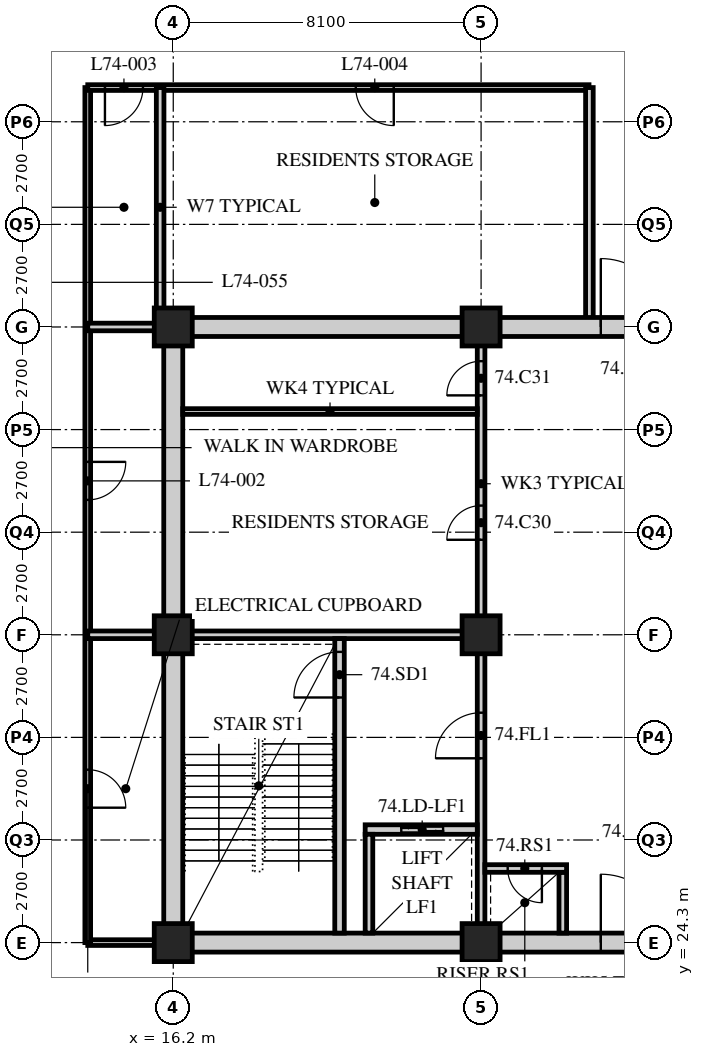
"""IFC4 building model, lengths in metres.
Left out: names, types, materials, properties, quantities, classifications, styles, units other than length and angle.
Written with IfcOpenShell. Run it as: python <this file> out.ifc"""

import sys

from ifc_helpers import new_model, si_unit, direction, frame, frame_2d, origin, origin_2d, place, context, subcontext, project, spatial, rectangle, hollow_rectangle, extrude, element, fill, save


model = new_model("IFC4")
c1 = context("Model", 3, precision=1e-05, world=origin(), true_north=direction((0.0, 1.0)))
c2 = subcontext(c1, "Body", "Model", "MODEL_VIEW")
j1 = project(units=[si_unit("LENGTHUNIT", "METRE"), si_unit("PLANEANGLEUNIT", "RADIAN")], contexts=[c1])
p1 = place(None, origin())
s1 = spatial("IfcSite", under=j1, at=p1, CompositionType="ELEMENT")
p2 = place(p1, origin())
s2 = spatial("IfcBuilding", under=s1, at=p2, CompositionType="ELEMENT")
p3 = place(p2, frame((0.0, 0.0, 289.2)))
s3 = spatial("IfcBuildingStorey", under=s2, at=p3, CompositionType="ELEMENT", Elevation=289.2)
for number, where, z_axis, x_axis in (
    (1, (16.2, 24.3, 0.0), (0.0, 0.0, 1.0), (1.0, 0.0, 0.0)),
    (2, (16.2, 32.4, 0.0), (0.0, 0.0, 1.0), (1.0, 0.0, 0.0)),
    (3, (16.2, 40.5, 0.0), (0.0, 0.0, 1.0), (1.0, 0.0, 0.0)),
    (4, (24.3, 24.3, 0.0), (0.0, 0.0, 1.0), (1.0, 0.0, 0.0)),
    (5, (24.3, 32.4, 0.0), (0.0, 0.0, 1.0), (1.0, 0.0, 0.0)),
    (6, (24.3, 40.5, 0.0), (0.0, 0.0, 1.0), (1.0, 0.0, 0.0)),
):
    element("IfcColumn", number, at=place(p3, frame(where, z_axis=z_axis, x_axis=x_axis)), inside=s3, PredefinedType="COLUMN", context=c2, shape_type="SweptSolid", body=[
        extrude(hollow_rectangle(XDim=1.0, YDim=1.0, WallThickness=0.1, at=origin_2d()), origin(), (0.0, 0.0, 1.0), 3.9),
    ])
p4 = place(p3, frame((16.0, 24.3, 0.0), z_axis=(0.0, 0.0, 1.0), x_axis=(-1.0, 0.0, 0.0)))
e7 = element("IfcWall", 7, at=p4, inside=s3, PredefinedType="PARTITIONING", context=c2, shape_type="SweptSolid", body=[
    extrude(rectangle(XDim=2.05, YDim=0.15, at=frame_2d((1.025, 0.0))), origin(), (0.0, 0.0, 1.0), 3.078),
])
p5 = place(p3, frame((13.95, 24.3, 0.0), z_axis=(0.0, 0.0, 1.0), x_axis=(0.0, 1.0, 0.0)))
e8 = element("IfcWall", 8, at=p5, inside=s3, PredefinedType="PARTITIONING", context=c2, shape_type="SweptSolid", body=[
    extrude(rectangle(XDim=22.5, YDim=0.15, at=frame_2d((11.25, 0.0))), origin(), (0.0, 0.0, 1.0), 3.69),
])
p6 = place(p5, frame((3.55, 0.0, 0.0)))
e9 = element("IfcOpeningElement", 9, at=p6, cuts=e8, PredefinedType="OPENING", context=c2, shape_type="SweptSolid", body=[
    extrude(rectangle(XDim=1.0, YDim=2.1, at=frame_2d((0.5, 1.05))), frame((0.0, 0.085, 0.0), z_axis=(0.0, -1.0, 0.0), x_axis=(1.0, 0.0, 0.0)), (0.0, 0.0, 1.0), 0.17),
])
p7 = place(p5, frame((11.65, 0.0, 0.0)))
e10 = element("IfcOpeningElement", 10, at=p7, cuts=e8, PredefinedType="OPENING", context=c2, shape_type="SweptSolid", body=[
    extrude(rectangle(XDim=1.0, YDim=2.1, at=frame_2d((0.5, 1.05))), frame((0.0, 0.085, 0.0), z_axis=(0.0, -1.0, 0.0), x_axis=(1.0, 0.0, 0.0)), (0.0, 0.0, 1.0), 0.17),
])
p8 = place(p3, frame((13.95, 46.8, 0.0), z_axis=(0.0, 0.0, 1.0), x_axis=(1.0, 0.0, 0.0)))
e11 = element("IfcWall", 11, at=p8, inside=s3, PredefinedType="PARTITIONING", context=c2, shape_type="SweptSolid", body=[
    extrude(rectangle(XDim=13.19, YDim=0.15, at=frame_2d((6.595, 0.0))), origin(), (0.0, 0.0, 1.0), 3.69),
])
p9 = place(p8, frame((0.452, 0.0, 0.0)))
e12 = element("IfcOpeningElement", 12, at=p9, cuts=e11, PredefinedType="OPENING", context=c2, shape_type="SweptSolid", body=[
    extrude(rectangle(XDim=1.0, YDim=2.1, at=frame_2d((0.5, 1.05))), frame((0.0, 0.085, 0.0), z_axis=(0.0, -1.0, 0.0), x_axis=(1.0, 0.0, 0.0)), (0.0, 0.0, 1.0), 0.17),
])
p10 = place(p8, frame((7.052, 0.0, 0.0)))
e13 = element("IfcOpeningElement", 13, at=p10, cuts=e11, PredefinedType="OPENING", context=c2, shape_type="SweptSolid", body=[
    extrude(rectangle(XDim=1.0, YDim=2.1, at=frame_2d((0.5, 1.05))), frame((0.0, 0.085, 0.0), z_axis=(0.0, -1.0, 0.0), x_axis=(1.0, 0.0, 0.0)), (0.0, 0.0, 1.0), 0.17),
])
p11 = place(p3, frame((13.95, 32.4, 0.0), z_axis=(0.0, 0.0, 1.0), x_axis=(1.0, 0.0, 0.0)))
e14 = element("IfcWall", 14, at=p11, inside=s3, PredefinedType="SOLIDWALL", context=c2, shape_type="SweptSolid", body=[
    extrude(rectangle(XDim=2.25, YDim=0.2, at=frame_2d((1.125, 0.0))), origin(), (0.0, 0.0, 1.0), 3.078),
])
for number, where, z_axis, x_axis in (
    (15, (15.855, 46.8, 0.0), (0.0, 0.0, 1.0), (0.0, -1.0, 0.0)),
    (16, (27.15, 40.5, 0.0), (0.0, 0.0, 1.0), (0.0, 1.0, 0.0)),
):
    element("IfcWall", number, at=place(p3, frame(where, z_axis=z_axis, x_axis=x_axis)), inside=s3, PredefinedType="SOLIDWALL", context=c2, shape_type="SweptSolid", body=[
        extrude(rectangle(XDim=6.3, YDim=0.2, at=frame_2d((3.15, 0.0))), origin(), (0.0, 0.0, 1.0), 3.69),
    ])
p12 = place(p3, frame((13.95, 40.5, 0.0), z_axis=(0.0, 0.0, 1.0), x_axis=(1.0, 0.0, 0.0)))
e17 = element("IfcWall", 17, at=p12, inside=s3, PredefinedType="SOLIDWALL", context=c2, shape_type="SweptSolid", body=[
    extrude(rectangle(XDim=2.25, YDim=0.2, at=frame_2d((1.125, 0.0))), origin(), (0.0, 0.0, 1.0), 3.078),
])
p13 = place(p3, frame((15.95, 24.3, 0.0), z_axis=(0.0, 0.0, 1.0), x_axis=(1.0, 0.0, 0.0)))
e18 = element("IfcWall", 18, at=p13, inside=s3, PredefinedType="SOLIDWALL", context=c2, shape_type="SweptSolid", body=[
    extrude(rectangle(XDim=24.55, YDim=0.5, at=frame_2d((12.275, 0.0))), origin(), (0.0, 0.0, 1.0), 3.04),
])
p14 = place(p13, frame((11.5, 0.0, 0.0)))
e19 = element("IfcOpeningElement", 19, at=p14, cuts=e18, PredefinedType="OPENING", context=c2, shape_type="SweptSolid", body=[
    extrude(rectangle(XDim=1.8, YDim=2.4, at=frame_2d((0.9, 1.2))), frame((0.0, 0.26, 0.0), z_axis=(0.0, -1.0, 0.0), x_axis=(1.0, 0.0, 0.0)), (0.0, 0.0, 1.0), 0.52),
])
p15 = place(p3, frame((15.95, 40.5, 0.0), z_axis=(0.0, 0.0, 1.0), x_axis=(1.0, 0.0, 0.0)))
e20 = element("IfcWall", 20, at=p15, inside=s3, PredefinedType="SOLIDWALL", context=c2, shape_type="SweptSolid", body=[
    extrude(rectangle(XDim=24.55, YDim=0.5, at=frame_2d((12.275, 0.0))), origin(), (0.0, 0.0, 1.0), 3.04),
])
p16 = place(p15, frame((11.5, 0.0, 0.0)))
e21 = element("IfcOpeningElement", 21, at=p16, cuts=e20, PredefinedType="OPENING", context=c2, shape_type="SweptSolid", body=[
    extrude(rectangle(XDim=1.8, YDim=2.4, at=frame_2d((0.9, 1.2))), frame((0.0, 0.26, 0.0), z_axis=(0.0, -1.0, 0.0), x_axis=(1.0, 0.0, 0.0)), (0.0, 0.0, 1.0), 0.52),
])
p17 = place(p3, frame((16.2, 24.55, 0.0), z_axis=(0.0, 0.0, 1.0), x_axis=(0.0, 1.0, 0.0)))
e22 = element("IfcWall", 22, at=p17, inside=s3, PredefinedType="SOLIDWALL", context=c2, shape_type="SweptSolid", body=[
    extrude(rectangle(XDim=15.7, YDim=0.5, at=frame_2d((7.85, 0.0))), origin(), (0.0, 0.0, 1.0), 3.078),
])
p18 = place(p3, frame((16.45, 32.4, 0.0), z_axis=(0.0, 0.0, 1.0), x_axis=(1.0, 0.0, 0.0)))
e23 = element("IfcWall", 23, at=p18, inside=s3, PredefinedType="SOLIDWALL", context=c2, shape_type="SweptSolid", body=[
    extrude(rectangle(XDim=7.95, YDim=0.2, at=frame_2d((3.975, 0.0))), origin(), (0.0, 0.0, 1.0), 3.078),
])
p19 = place(p3, frame((24.3, 24.55, 0.0), z_axis=(0.0, 0.0, 1.0), x_axis=(0.0, 1.0, 0.0)))
e24 = element("IfcWall", 24, at=p19, inside=s3, PredefinedType="SOLIDWALL", context=c2, shape_type="SweptSolid", body=[
    extrude(rectangle(XDim=7.75, YDim=0.2, at=frame_2d((3.875, 0.0))), origin(), (0.0, 0.0, 1.0), 3.078),
])
p20 = place(p19, frame((4.6, 0.0, 0.0)))
e25 = element("IfcOpeningElement", 25, at=p20, cuts=e24, PredefinedType="OPENING", context=c2, shape_type="SweptSolid", body=[
    extrude(rectangle(XDim=1.2, YDim=2.1, at=frame_2d((0.6, 1.05))), frame((0.0, 0.11, 0.0), z_axis=(0.0, -1.0, 0.0), x_axis=(1.0, 0.0, 0.0)), (0.0, 0.0, 1.0), 0.22),
])
p21 = place(p3, frame((20.575, 24.55, 0.0), z_axis=(0.0, 0.0, 1.0), x_axis=(0.0, 1.0, 0.0)))
e26 = element("IfcWall", 26, at=p21, inside=s3, PredefinedType="SOLIDWALL", context=c2, shape_type="SweptSolid", body=[
    extrude(rectangle(XDim=7.75, YDim=0.25, at=frame_2d((3.875, 0.0))), origin(), (0.0, 0.0, 1.0), 3.69),
])
p22 = place(p21, frame((6.2, 0.0, 0.0)))
e27 = element("IfcOpeningElement", 27, at=p22, cuts=e26, PredefinedType="OPENING", context=c2, shape_type="SweptSolid", body=[
    extrude(rectangle(XDim=1.2, YDim=2.1, at=frame_2d((0.6, 1.05))), frame((0.0, 0.135, 0.0), z_axis=(0.0, -1.0, 0.0), x_axis=(1.0, 0.0, 0.0)), (0.0, 0.0, 1.0), 0.27),
])
p23 = place(p3, frame((21.25, 27.275, 0.0), z_axis=(0.0, 0.0, 1.0), x_axis=(1.0, 0.0, 0.0)))
e28 = element("IfcWall", 28, at=p23, inside=s3, PredefinedType="SOLIDWALL", context=c2, shape_type="SweptSolid", body=[
    extrude(rectangle(XDim=2.95, YDim=0.25, at=frame_2d((1.475, 0.0))), origin(), (0.0, 0.0, 1.0), 3.69),
])
p24 = place(p23, frame((0.95, 0.0, 0.0)))
e29 = element("IfcOpeningElement", 29, at=p24, cuts=e28, PredefinedType="OPENING", context=c2, shape_type="SweptSolid", body=[
    extrude(rectangle(XDim=1.1, YDim=2.4, at=frame_2d((0.55, 1.2))), frame((0.0, 0.135, 0.0), z_axis=(0.0, -1.0, 0.0), x_axis=(1.0, 0.0, 0.0)), (0.0, 0.0, 1.0), 0.27),
])
p25 = place(p3, frame((21.35, 24.55, 0.0), z_axis=(0.0, 0.0, 1.0), x_axis=(0.0, 1.0, 0.0)))
e30 = element("IfcWall", 30, at=p25, inside=s3, PredefinedType="SOLIDWALL", context=c2, shape_type="SweptSolid", body=[
    extrude(rectangle(XDim=2.6, YDim=0.2, at=frame_2d((1.3, 0.0))), origin(), (0.0, 0.0, 1.0), 3.69),
])
p26 = place(p3, frame((26.45, 24.55, 0.0), z_axis=(0.0, 0.0, 1.0), x_axis=(0.0, 1.0, 0.0)))
e31 = element("IfcWall", 31, at=p26, inside=s3, PredefinedType="SOLIDWALL", context=c2, shape_type="SweptSolid", body=[
    extrude(rectangle(XDim=1.6, YDim=0.2, at=frame_2d((0.8, 0.0))), origin(), (0.0, 0.0, 1.0), 3.69),
])
p27 = place(p3, frame((24.4, 26.25, 0.0), z_axis=(0.0, 0.0, 1.0), x_axis=(1.0, 0.0, 0.0)))
e32 = element("IfcWall", 32, at=p27, inside=s3, PredefinedType="SOLIDWALL", context=c2, shape_type="SweptSolid", body=[
    extrude(rectangle(XDim=2.15, YDim=0.2, at=frame_2d((1.075, 0.0))), origin(), (0.0, 0.0, 1.0), 3.69),
])
p28 = place(p27, frame((0.6, 0.0, 0.0)))
e33 = element("IfcOpeningElement", 33, at=p28, cuts=e32, PredefinedType="OPENING", context=c2, shape_type="SweptSolid", body=[
    extrude(rectangle(XDim=0.9, YDim=2.1, at=frame_2d((0.45, 1.05))), frame((0.0, 0.11, 0.0), z_axis=(0.0, -1.0, 0.0), x_axis=(1.0, 0.0, 0.0)), (0.0, 0.0, 1.0), 0.22),
])
p29 = place(p3, frame((24.3, 32.5, 0.0), z_axis=(0.0, 0.0, 1.0), x_axis=(0.0, 1.0, 0.0)))
e34 = element("IfcWall", 34, at=p29, inside=s3, PredefinedType="PARTITIONING", context=c2, shape_type="SweptSolid", body=[
    extrude(rectangle(XDim=7.75, YDim=0.2, at=frame_2d((3.875, 0.0))), origin(), (0.0, 0.0, 1.0), 3.078),
])
p30 = place(p29, frame((2.4, 0.0, 0.0)))
e35 = element("IfcOpeningElement", 35, at=p30, cuts=e34, PredefinedType="OPENING", context=c2, shape_type="SweptSolid", body=[
    extrude(rectangle(XDim=0.9, YDim=2.1, at=frame_2d((0.45, 1.05))), frame((0.0, 0.11, 0.0), z_axis=(0.0, -1.0, 0.0), x_axis=(1.0, 0.0, 0.0)), (0.0, 0.0, 1.0), 0.22),
])
p31 = place(p29, frame((6.2, 0.0, 0.0)))
e36 = element("IfcOpeningElement", 36, at=p31, cuts=e34, PredefinedType="OPENING", context=c2, shape_type="SweptSolid", body=[
    extrude(rectangle(XDim=0.9, YDim=2.1, at=frame_2d((0.45, 1.05))), frame((0.0, 0.11, 0.0), z_axis=(0.0, -1.0, 0.0), x_axis=(1.0, 0.0, 0.0)), (0.0, 0.0, 1.0), 0.22),
])
p32 = place(p3, frame((16.45, 38.275, 0.0), z_axis=(0.0, 0.0, 1.0), x_axis=(1.0, 0.0, 0.0)))
e37 = element("IfcWall", 37, at=p32, inside=s3, PredefinedType="PARTITIONING", context=c2, shape_type="SweptSolid", body=[
    extrude(rectangle(XDim=7.75, YDim=0.15, at=frame_2d((3.875, 0.0))), origin(), (0.0, 0.0, 1.0), 3.69),
])
p33 = place(p6, origin())
e38 = element("IfcDoor", 38, at=p33, inside=s3, OperationType="SINGLE_SWING_RIGHT", PredefinedType="DOOR", context=c2, shape_type="SweptSolid", body=[
    extrude(rectangle(XDim=1.0, YDim=2.1, at=frame_2d((0.5, 1.05))), frame((0.0, 0.025, 0.0), z_axis=(0.0, -1.0, 0.0), x_axis=(1.0, 0.0, 0.0)), (0.0, 0.0, 1.0), 0.05),
])
fill(e9, e38)
p34 = place(p7, origin())
e39 = element("IfcDoor", 39, at=p34, inside=s3, OperationType="SINGLE_SWING_LEFT", PredefinedType="DOOR", context=c2, shape_type="SweptSolid", body=[
    extrude(rectangle(XDim=1.0, YDim=2.1, at=frame_2d((0.5, 1.05))), frame((0.0, 0.025, 0.0), z_axis=(0.0, -1.0, 0.0), x_axis=(1.0, 0.0, 0.0)), (0.0, 0.0, 1.0), 0.05),
])
fill(e10, e39)
p35 = place(p9, origin())
e40 = element("IfcDoor", 40, at=p35, inside=s3, OperationType="SINGLE_SWING_RIGHT", PredefinedType="DOOR", context=c2, shape_type="SweptSolid", body=[
    extrude(rectangle(XDim=1.0, YDim=2.1, at=frame_2d((0.5, 1.05))), frame((0.0, 0.025, 0.0), z_axis=(0.0, -1.0, 0.0), x_axis=(1.0, 0.0, 0.0)), (0.0, 0.0, 1.0), 0.05),
])
fill(e12, e40)
p36 = place(p10, origin())
e41 = element("IfcDoor", 41, at=p36, inside=s3, OperationType="SINGLE_SWING_LEFT", PredefinedType="DOOR", context=c2, shape_type="SweptSolid", body=[
    extrude(rectangle(XDim=1.0, YDim=2.1, at=frame_2d((0.5, 1.05))), frame((0.0, 0.025, 0.0), z_axis=(0.0, -1.0, 0.0), x_axis=(1.0, 0.0, 0.0)), (0.0, 0.0, 1.0), 0.05),
])
fill(e13, e41)
p37 = place(p30, origin())
e42 = element("IfcDoor", 42, at=p37, inside=s3, OperationType="SINGLE_SWING_LEFT", PredefinedType="DOOR", context=c2, shape_type="SweptSolid", body=[
    extrude(rectangle(XDim=0.9, YDim=2.1, at=frame_2d((0.45, 1.05))), frame((0.0, 0.025, 0.0), z_axis=(0.0, -1.0, 0.0), x_axis=(1.0, 0.0, 0.0)), (0.0, 0.0, 1.0), 0.05),
])
fill(e35, e42)
p38 = place(p31, origin())
e43 = element("IfcDoor", 43, at=p38, inside=s3, OperationType="SINGLE_SWING_LEFT", PredefinedType="DOOR", context=c2, shape_type="SweptSolid", body=[
    extrude(rectangle(XDim=0.9, YDim=2.1, at=frame_2d((0.45, 1.05))), frame((0.0, 0.025, 0.0), z_axis=(0.0, -1.0, 0.0), x_axis=(1.0, 0.0, 0.0)), (0.0, 0.0, 1.0), 0.05),
])
fill(e36, e43)
p39 = place(p22, origin())
e44 = element("IfcDoor", 44, at=p39, inside=s3, OperationType="SINGLE_SWING_LEFT", PredefinedType="DOOR", context=c2, shape_type="SweptSolid", body=[
    extrude(rectangle(XDim=1.2, YDim=2.1, at=frame_2d((0.6, 1.05))), frame((0.0, 0.025, 0.0), z_axis=(0.0, -1.0, 0.0), x_axis=(1.0, 0.0, 0.0)), (0.0, 0.0, 1.0), 0.05),
])
fill(e27, e44)
p40 = place(p20, origin())
e45 = element("IfcDoor", 45, at=p40, inside=s3, OperationType="SINGLE_SWING_LEFT", PredefinedType="DOOR", context=c2, shape_type="SweptSolid", body=[
    extrude(rectangle(XDim=1.2, YDim=2.1, at=frame_2d((0.6, 1.05))), frame((0.0, 0.025, 0.0), z_axis=(0.0, -1.0, 0.0), x_axis=(1.0, 0.0, 0.0)), (0.0, 0.0, 1.0), 0.05),
])
fill(e25, e45)
p41 = place(p28, origin())
e46 = element("IfcDoor", 46, at=p41, inside=s3, OperationType="SINGLE_SWING_LEFT", PredefinedType="DOOR", context=c2, shape_type="SweptSolid", body=[
    extrude(rectangle(XDim=0.9, YDim=2.1, at=frame_2d((0.45, 1.05))), frame((0.0, 0.025, 0.0), z_axis=(0.0, -1.0, 0.0), x_axis=(1.0, 0.0, 0.0)), (0.0, 0.0, 1.0), 0.05),
])
fill(e33, e46)
p42 = place(p24, origin())
e47 = element("IfcDoor", 47, at=p42, inside=s3, OperationType="DOUBLE_DOOR_SLIDING", PredefinedType="DOOR", context=c2, shape_type="SweptSolid", body=[
    extrude(rectangle(XDim=1.1, YDim=2.4, at=frame_2d((0.55, 1.2))), frame((0.0, 0.025, 0.0), z_axis=(0.0, -1.0, 0.0), x_axis=(1.0, 0.0, 0.0)), (0.0, 0.0, 1.0), 0.05),
])
fill(e29, e47)
p43 = place(p14, origin())
e48 = element("IfcDoor", 48, at=p43, inside=s3, OperationType="DOUBLE_DOOR_SINGLE_SWING", PredefinedType="DOOR", context=c2, shape_type="SweptSolid", body=[
    extrude(rectangle(XDim=1.8, YDim=2.4, at=frame_2d((0.9, 1.2))), frame((0.0, 0.025, 0.0), z_axis=(0.0, -1.0, 0.0), x_axis=(1.0, 0.0, 0.0)), (0.0, 0.0, 1.0), 0.05),
])
fill(e19, e48)
p44 = place(p16, origin())
e49 = element("IfcDoor", 49, at=p44, inside=s3, OperationType="DOUBLE_DOOR_SINGLE_SWING", PredefinedType="DOOR", context=c2, shape_type="SweptSolid", body=[
    extrude(rectangle(XDim=1.8, YDim=2.4, at=frame_2d((0.9, 1.2))), frame((0.0, 0.025, 0.0), z_axis=(0.0, -1.0, 0.0), x_axis=(1.0, 0.0, 0.0)), (0.0, 0.0, 1.0), 0.05),
])
fill(e21, e49)
save(model, sys.argv[1])
